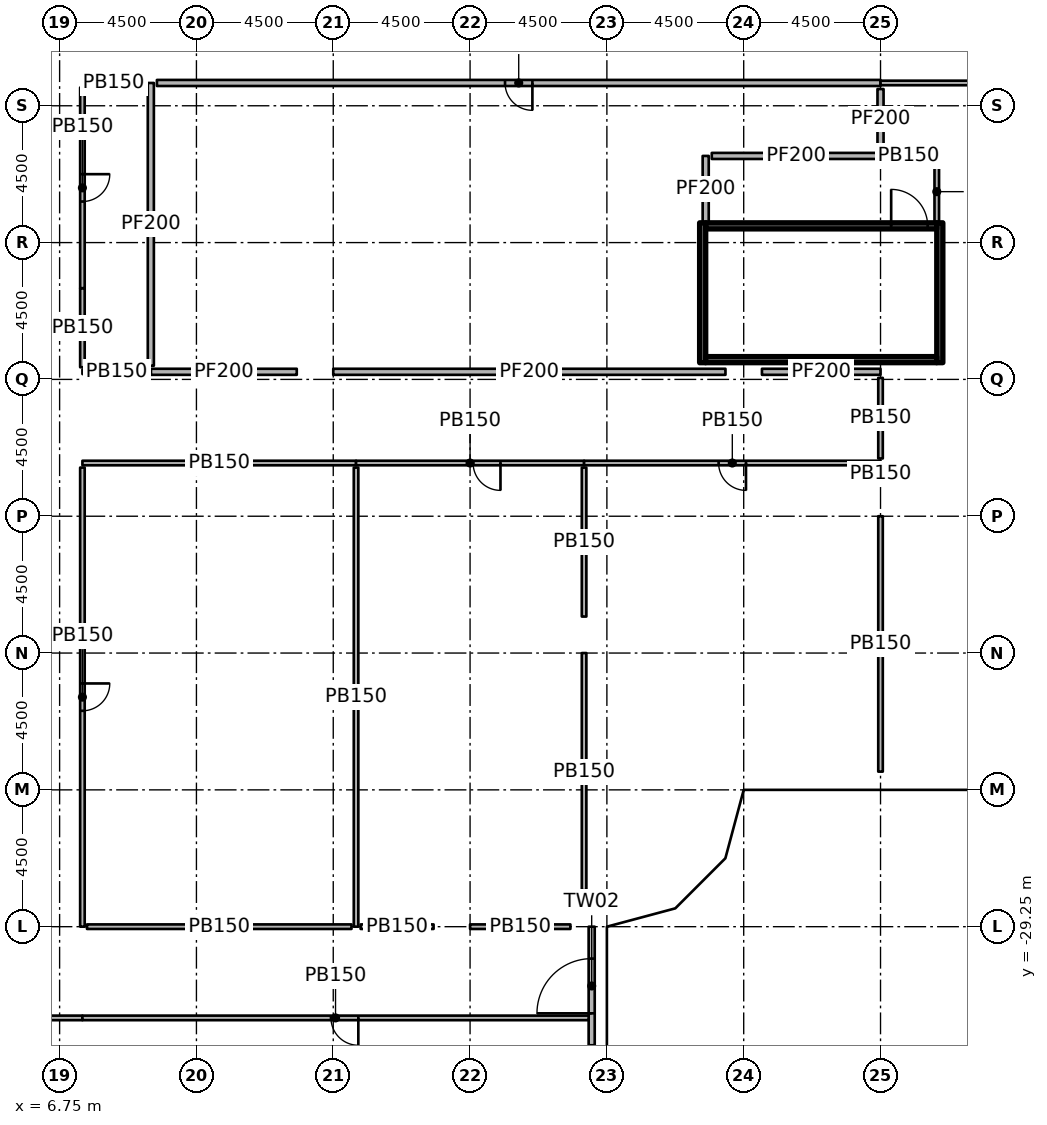
"""IFC4 building model, lengths in metres.
Left out: names, types, materials, properties, quantities, classifications, styles, units other than length and angle.
Written with IfcOpenShell. Run it as: python <this file> out.ifc"""

import sys

from ifc_helpers import new_model, si_unit, direction, frame, frame_2d, origin, origin_2d, place, context, subcontext, project, spatial, rectangle, extrude, element, fill, save


model = new_model("IFC4")
c1 = context("Model", 3, precision=1e-05, world=origin(), true_north=direction((0.0, 1.0)))
c2 = subcontext(c1, "Body", "Model", "MODEL_VIEW")
j1 = project(units=[si_unit("LENGTHUNIT", "METRE"), si_unit("PLANEANGLEUNIT", "RADIAN")], contexts=[c1])
p1 = place(None, origin())
s1 = spatial("IfcSite", under=j1, at=p1, CompositionType="ELEMENT")
p2 = place(p1, origin())
s2 = spatial("IfcBuilding", under=s1, at=p2, CompositionType="ELEMENT")
p3 = place(p2, frame((0.0, 0.0, 7.0)))
s3 = spatial("IfcBuildingStorey", under=s2, at=p3, CompositionType="ELEMENT", Elevation=7.0)
for number, where, z_axis, x_axis in (
    (1, (6.25, -26.9, 0.0), (0.0, 0.0, 1.0), (1.0, 0.0, 0.0)),
    (2, (6.25, -24.65, 0.0), (0.0, 0.0, 1.0), (1.0, 0.0, 0.0)),
    (3, (6.25, -20.25, 0.0), (0.0, 0.0, 1.0), (1.0, 0.0, 0.0)),
    (4, (6.25, -15.75, 0.0), (0.0, 0.0, 1.0), (1.0, 0.0, 0.0)),
    (5, (6.25, -10.75, 0.0), (0.0, 0.0, 1.0), (1.0, 0.0, 0.0)),
    (6, (6.25, -6.25, 0.0), (0.0, 0.0, 1.0), (1.0, 0.0, 0.0)),
    (7, (10.65, -33.75, 0.0), (0.0, 0.0, 1.0), (1.0, 0.0, 0.0)),
    (8, (10.65, -20.25, 0.0), (0.0, 0.0, 1.0), (1.0, 0.0, 0.0)),
    (9, (10.65, -15.15, 0.0), (0.0, 0.0, 1.0), (1.0, 0.0, 0.0)),
    (10, (10.75, -6.25, 0.0), (0.0, 0.0, 1.0), (1.0, 0.0, 0.0)),
    (11, (15.15, -24.75, 0.0), (0.0, 0.0, 1.0), (1.0, 0.0, 0.0)),
    (12, (15.15, -19.65, 0.0), (0.0, 0.0, 1.0), (1.0, 0.0, 0.0)),
    (13, (15.15, -10.65, 0.0), (0.0, 0.0, 1.0), (1.0, 0.0, 0.0)),
    (14, (15.75, -6.25, 0.0), (0.0, 0.0, 1.0), (1.0, 0.0, 0.0)),
    (15, (19.65, -29.25, 0.0), (0.0, 0.0, 1.0), (1.0, 0.0, 0.0)),
    (16, (19.65, -24.15, 0.0), (0.0, 0.0, 1.0), (1.0, 0.0, 0.0)),
    (17, (19.65, -15.15, 0.0), (0.0, 0.0, 1.0), (1.0, 0.0, 0.0)),
    (18, (20.25, -6.11, 0.0), (0.0, 0.0, 1.0), (1.0, 0.0, 0.0)),
    (19, (24.15, -33.75, 0.0), (0.0, 0.0, 1.0), (1.0, 0.0, 0.0)),
    (20, (24.15, -28.65, 0.0), (0.0, 0.0, 1.0), (1.0, 0.0, 0.0)),
    (21, (24.15, -19.65, 0.0), (0.0, 0.0, 1.0), (1.0, 0.0, 0.0)),
    (22, (24.75, -6.11, 0.0), (0.0, 0.0, 1.0), (1.0, 0.0, 0.0)),
    (23, (28.65, -24.15, 0.0), (0.0, 0.0, 1.0), (1.0, 0.0, 0.0)),
    (24, (28.908, -5.475, 0.0), (0.0, 0.0, 1.0), (1.0, 0.0, 0.0)),
    (25, (28.67, -2.25, 0.0), (0.0, 0.0, 1.0), (1.0, 0.0, 0.0)),
    (26, (33.75, -15.15, 0.0), (0.0, 0.0, 1.0), (1.0, 0.0, 0.0)),
    (27, (33.11, -2.25, 0.0), (0.0, 0.0, 1.0), (1.0, 0.0, 0.0)),
):
    element("IfcColumn", number, at=place(p3, frame(where, z_axis=z_axis, x_axis=x_axis)), inside=s3, PredefinedType="COLUMN", context=c2, shape_type="SweptSolid", body=[
        extrude(rectangle(XDim=1.2, YDim=1.2, at=origin_2d()), origin(), (0.0, 0.0, 1.0), 4.55),
    ])
p4 = place(p3, frame((24.25, -33.15, 0.0), z_axis=(0.0, 0.0, 1.0), x_axis=(0.0, 1.0, 0.0)))
e28 = element("IfcWall", 28, at=p4, inside=s3, PredefinedType="SOLIDWALL", context=c2, shape_type="SweptSolid", body=[
    extrude(rectangle(XDim=3.9, YDim=0.2, at=frame_2d((1.95, 0.0))), origin(), (0.0, 0.0, 1.0), 4.55),
])
p5 = place(p4, frame((1.05, 0.0, 0.0)))
e29 = element("IfcOpeningElement", 29, at=p5, cuts=e28, PredefinedType="OPENING", context=c2, shape_type="SweptSolid", body=[
    extrude(rectangle(XDim=1.8, YDim=2.4, at=frame_2d((0.9, 1.2))), frame((0.0, 0.11, 0.0), z_axis=(0.0, -1.0, 0.0), x_axis=(1.0, 0.0, 0.0)), (0.0, 0.0, 1.0), 0.22),
])
for number, where, z_axis, x_axis in (
    (30, (27.9, -10.7, 0.0), (0.0, 0.0, 1.0), (0.0, 1.0, 0.0)),
    (31, (35.7, -10.7, 0.0), (0.0, 0.0, 1.0), (0.0, 1.0, 0.0)),
):
    element("IfcWall", number, at=place(p3, frame(where, z_axis=z_axis, x_axis=x_axis)), inside=s3, PredefinedType="SHEAR", context=c2, shape_type="SweptSolid", body=[
        extrude(rectangle(XDim=4.6, YDim=0.2, at=frame_2d((2.3, 0.0))), origin(), (0.0, 0.0, 1.0), 4.55),
    ])
p6 = place(p3, frame((28.0, -10.6, 0.0), z_axis=(0.0, 0.0, 1.0), x_axis=(1.0, 0.0, 0.0)))
e32 = element("IfcWall", 32, at=p6, inside=s3, PredefinedType="SHEAR", context=c2, shape_type="SweptSolid", body=[
    extrude(rectangle(XDim=7.6, YDim=0.2, at=frame_2d((3.8, 0.0))), origin(), (0.0, 0.0, 1.0), 4.55),
])
p7 = place(p3, frame((28.0, -6.2, 0.0), z_axis=(0.0, 0.0, 1.0), x_axis=(1.0, 0.0, 0.0)))
e33 = element("IfcWall", 33, at=p7, inside=s3, PredefinedType="SHEAR", context=c2, shape_type="SweptSolid", body=[
    extrude(rectangle(XDim=7.6, YDim=0.2, at=frame_2d((3.8, 0.0))), origin(), (0.0, 0.0, 1.0), 4.55),
])
p8 = place(p7, frame((6.1, 0.0, 0.0)))
e34 = element("IfcOpeningElement", 34, at=p8, cuts=e33, PredefinedType="OPENING", context=c2, shape_type="SweptSolid", body=[
    extrude(rectangle(XDim=1.2, YDim=2.1, at=frame_2d((0.6, 1.05))), frame((0.0, 0.11, 0.0), z_axis=(0.0, -1.0, 0.0), x_axis=(1.0, 0.0, 0.0)), (0.0, 0.0, 1.0), 0.22),
])
p9 = place(p3, frame((28.0, -6.1, 0.0), z_axis=(0.0, 0.0, 1.0), x_axis=(0.0, 1.0, 0.0)))
e35 = element("IfcWall", 35, at=p9, inside=s3, PredefinedType="PARTITIONING", context=c2, shape_type="SweptSolid", body=[
    extrude(rectangle(XDim=2.2, YDim=0.2, at=frame_2d((1.1, 0.0))), origin(), (0.0, 0.0, 1.0), 4.55),
])
p10 = place(p3, frame((28.2, -3.9, 0.0), z_axis=(0.0, 0.0, 1.0), x_axis=(1.0, 0.0, 0.0)))
e36 = element("IfcWall", 36, at=p10, inside=s3, PredefinedType="PARTITIONING", context=c2, shape_type="SweptSolid", body=[
    extrude(rectangle(XDim=5.55, YDim=0.2, at=frame_2d((2.775, 0.0))), origin(), (0.0, 0.0, 1.0), 4.55),
])
p11 = place(p3, frame((33.75, -3.9, 0.0), z_axis=(0.0, 0.0, 1.0), x_axis=(1.0, 0.0, 0.0)))
e37 = element("IfcWall", 37, at=p11, inside=s3, PredefinedType="PARTITIONING", context=c2, shape_type="SweptSolid", body=[
    extrude(rectangle(XDim=1.85, YDim=0.15, at=frame_2d((0.925, 0.0))), origin(), (0.0, 0.0, 1.0), 4.55),
])
p12 = place(p3, frame((35.6, -4.05, 0.0), z_axis=(0.0, 0.0, 1.0), x_axis=(0.0, -1.0, 0.0)))
e38 = element("IfcWall", 38, at=p12, inside=s3, PredefinedType="PARTITIONING", context=c2, shape_type="SweptSolid", body=[
    extrude(rectangle(XDim=2.05, YDim=0.15, at=frame_2d((1.025, 0.0))), origin(), (0.0, 0.0, 1.0), 4.55),
])
p13 = place(p3, frame((9.75, -11.0, 0.0), z_axis=(0.0, 0.0, 1.0), x_axis=(1.0, 0.0, 0.0)))
e39 = element("IfcWall", 39, at=p13, inside=s3, PredefinedType="PARTITIONING", context=c2, shape_type="SweptSolid", body=[
    extrude(rectangle(XDim=4.8, YDim=0.2, at=frame_2d((2.4, 0.0))), origin(), (0.0, 0.0, 1.0), 4.55),
])
p14 = place(p3, frame((15.75, -11.0, 0.0), z_axis=(0.0, 0.0, 1.0), x_axis=(1.0, 0.0, 0.0)))
e40 = element("IfcWall", 40, at=p14, inside=s3, PredefinedType="PARTITIONING", context=c2, shape_type="SweptSolid", body=[
    extrude(rectangle(XDim=12.9, YDim=0.2, at=frame_2d((6.45, 0.0))), origin(), (0.0, 0.0, 1.0), 4.55),
])
p15 = place(p3, frame((29.85, -11.0, 0.0), z_axis=(0.0, 0.0, 1.0), x_axis=(1.0, 0.0, 0.0)))
e41 = element("IfcWall", 41, at=p15, inside=s3, PredefinedType="PARTITIONING", context=c2, shape_type="SweptSolid", body=[
    extrude(rectangle(XDim=3.9, YDim=0.2, at=frame_2d((1.95, 0.0))), origin(), (0.0, 0.0, 1.0), 4.55),
])
p16 = place(p3, frame((7.5, -11.0, 0.0), z_axis=(0.0, 0.0, 1.0), x_axis=(1.0, 0.0, 0.0)))
e42 = element("IfcWall", 42, at=p16, inside=s3, PredefinedType="PARTITIONING", context=c2, shape_type="SweptSolid", body=[
    extrude(rectangle(XDim=2.25, YDim=0.15, at=frame_2d((1.125, 0.0))), origin(), (0.0, 0.0, 1.0), 4.55),
])
p17 = place(p3, frame((16.5, -14.0, 0.0), z_axis=(0.0, 0.0, 1.0), x_axis=(-1.0, 0.0, 0.0)))
e43 = element("IfcWall", 43, at=p17, inside=s3, PredefinedType="PARTITIONING", context=c2, shape_type="SweptSolid", body=[
    extrude(rectangle(XDim=9.0, YDim=0.15, at=frame_2d((4.5, 0.0))), origin(), (0.0, 0.0, 1.0), 4.55),
])
p18 = place(p3, frame((24.0, -14.0, 0.0), z_axis=(0.0, 0.0, 1.0), x_axis=(-1.0, 0.0, 0.0)))
e44 = element("IfcWall", 44, at=p18, inside=s3, PredefinedType="PARTITIONING", context=c2, shape_type="SweptSolid", body=[
    extrude(rectangle(XDim=7.5, YDim=0.15, at=frame_2d((3.75, 0.0))), origin(), (0.0, 0.0, 1.0), 4.55),
])
p19 = place(p18, frame((2.75, 0.0, 0.0)))
e45 = element("IfcOpeningElement", 45, at=p19, cuts=e44, PredefinedType="OPENING", context=c2, shape_type="SweptSolid", body=[
    extrude(rectangle(XDim=0.9, YDim=2.1, at=frame_2d((0.45, 1.05))), frame((0.0, 0.085, 0.0), z_axis=(0.0, -1.0, 0.0), x_axis=(1.0, 0.0, 0.0)), (0.0, 0.0, 1.0), 0.17),
])
p20 = place(p3, frame((33.75, -14.0, 0.0), z_axis=(0.0, 0.0, 1.0), x_axis=(-1.0, 0.0, 0.0)))
e46 = element("IfcWall", 46, at=p20, inside=s3, PredefinedType="PARTITIONING", context=c2, shape_type="SweptSolid", body=[
    extrude(rectangle(XDim=9.75, YDim=0.15, at=frame_2d((4.875, 0.0))), origin(), (0.0, 0.0, 1.0), 4.55),
])
p21 = place(p20, frame((4.425, 0.0, 0.0)))
e47 = element("IfcOpeningElement", 47, at=p21, cuts=e46, PredefinedType="OPENING", context=c2, shape_type="SweptSolid", body=[
    extrude(rectangle(XDim=0.9, YDim=2.1, at=frame_2d((0.45, 1.05))), frame((0.0, 0.085, 0.0), z_axis=(0.0, -1.0, 0.0), x_axis=(1.0, 0.0, 0.0)), (0.0, 0.0, 1.0), 0.17),
])
p22 = place(p3, frame((33.75, -11.2, 0.0), z_axis=(0.0, 0.0, 1.0), x_axis=(0.0, -1.0, 0.0)))
e48 = element("IfcWall", 48, at=p22, inside=s3, PredefinedType="PARTITIONING", context=c2, shape_type="SweptSolid", body=[
    extrude(rectangle(XDim=2.65, YDim=0.15, at=frame_2d((1.325, 0.0))), origin(), (0.0, 0.0, 1.0), 4.55),
])
p23 = place(p3, frame((9.75, -10.8, 0.0), z_axis=(0.0, 0.0, 1.0), x_axis=(0.0, 1.0, 0.0)))
e49 = element("IfcWall", 49, at=p23, inside=s3, PredefinedType="PARTITIONING", context=c2, shape_type="SweptSolid", body=[
    extrude(rectangle(XDim=9.3, YDim=0.2, at=frame_2d((4.65, 0.0))), origin(), (0.0, 0.0, 1.0), 4.55),
])
p24 = place(p3, frame((33.75, -1.5, 0.0), z_axis=(0.0, 0.0, 1.0), x_axis=(-1.0, 0.0, 0.0)))
e50 = element("IfcWall", 50, at=p24, inside=s3, PredefinedType="PARTITIONING", context=c2, shape_type="SweptSolid", body=[
    extrude(rectangle(XDim=23.8, YDim=0.2, at=frame_2d((11.9, 0.0))), origin(), (0.0, 0.0, 1.0), 4.55),
])
p25 = place(p24, frame((11.45, 0.0, 0.0)))
e51 = element("IfcOpeningElement", 51, at=p25, cuts=e50, PredefinedType="OPENING", context=c2, shape_type="SweptSolid", body=[
    extrude(rectangle(XDim=0.9, YDim=2.1, at=frame_2d((0.45, 1.05))), frame((0.0, 0.11, 0.0), z_axis=(0.0, -1.0, 0.0), x_axis=(1.0, 0.0, 0.0)), (0.0, 0.0, 1.0), 0.22),
])
p26 = place(p3, frame((33.75, -1.7, 0.0), z_axis=(0.0, 0.0, 1.0), x_axis=(0.0, -1.0, 0.0)))
e52 = element("IfcWall", 52, at=p26, inside=s3, PredefinedType="PARTITIONING", context=c2, shape_type="SweptSolid", body=[
    extrude(rectangle(XDim=2.0, YDim=0.2, at=frame_2d((1.0, 0.0))), origin(), (0.0, 0.0, 1.0), 4.55),
])
p27 = place(p3, frame((7.5, -10.85, 0.0), z_axis=(0.0, 0.0, 1.0), x_axis=(0.0, 1.0, 0.0)))
e53 = element("IfcWall", 53, at=p27, inside=s3, PredefinedType="PARTITIONING", context=c2, shape_type="SweptSolid", body=[
    extrude(rectangle(XDim=2.6, YDim=0.15, at=frame_2d((1.3, 0.0))), origin(), (0.0, 0.0, 1.0), 4.55),
])
p28 = place(p3, frame((7.5, -1.5, 0.0), z_axis=(0.0, 0.0, 1.0), x_axis=(1.0, 0.0, 0.0)))
e54 = element("IfcWall", 54, at=p28, inside=s3, PredefinedType="PARTITIONING", context=c2, shape_type="SweptSolid", body=[
    extrude(rectangle(XDim=2.05, YDim=0.15, at=frame_2d((1.025, 0.0))), origin(), (0.0, 0.0, 1.0), 4.55),
])
p29 = place(p3, frame((7.5, -1.65, 0.0), z_axis=(0.0, 0.0, 1.0), x_axis=(0.0, -1.0, 0.0)))
e55 = element("IfcWall", 55, at=p29, inside=s3, PredefinedType="PARTITIONING", context=c2, shape_type="SweptSolid", body=[
    extrude(rectangle(XDim=6.6, YDim=0.15, at=frame_2d((3.3, 0.0))), origin(), (0.0, 0.0, 1.0), 4.55),
])
p30 = place(p29, frame((2.85, 0.0, 0.0)))
e56 = element("IfcOpeningElement", 56, at=p30, cuts=e55, PredefinedType="OPENING", context=c2, shape_type="SweptSolid", body=[
    extrude(rectangle(XDim=0.9, YDim=2.1, at=frame_2d((0.45, 1.05))), frame((0.0, 0.085, 0.0), z_axis=(0.0, -1.0, 0.0), x_axis=(1.0, 0.0, 0.0)), (0.0, 0.0, 1.0), 0.17),
])
p31 = place(p3, frame((16.5, -14.15, 0.0), z_axis=(0.0, 0.0, 1.0), x_axis=(0.0, -1.0, 0.0)))
e57 = element("IfcWall", 57, at=p31, inside=s3, PredefinedType="PARTITIONING", context=c2, shape_type="SweptSolid", body=[
    extrude(rectangle(XDim=15.1, YDim=0.15, at=frame_2d((7.55, 0.0))), origin(), (0.0, 0.0, 1.0), 4.55),
])
p32 = place(p3, frame((7.5, -14.15, 0.0), z_axis=(0.0, 0.0, 1.0), x_axis=(0.0, -1.0, 0.0)))
e58 = element("IfcWall", 58, at=p32, inside=s3, PredefinedType="PARTITIONING", context=c2, shape_type="SweptSolid", body=[
    extrude(rectangle(XDim=15.1, YDim=0.15, at=frame_2d((7.55, 0.0))), origin(), (0.0, 0.0, 1.0), 4.55),
])
p33 = place(p32, frame((7.1, 0.0, 0.0)))
e59 = element("IfcOpeningElement", 59, at=p33, cuts=e58, PredefinedType="OPENING", context=c2, shape_type="SweptSolid", body=[
    extrude(rectangle(XDim=0.9, YDim=2.1, at=frame_2d((0.45, 1.05))), frame((0.0, 0.085, 0.0), z_axis=(0.0, -1.0, 0.0), x_axis=(1.0, 0.0, 0.0)), (0.0, 0.0, 1.0), 0.17),
])
p34 = place(p3, frame((16.35, -29.25, 0.0), z_axis=(0.0, 0.0, 1.0), x_axis=(-1.0, 0.0, 0.0)))
e60 = element("IfcWall", 60, at=p34, inside=s3, PredefinedType="PARTITIONING", context=c2, shape_type="SweptSolid", body=[
    extrude(rectangle(XDim=8.7, YDim=0.15, at=frame_2d((4.35, 0.0))), origin(), (0.0, 0.0, 1.0), 4.55),
])
p35 = place(p3, frame((24.0, -14.15, 0.0), z_axis=(0.0, 0.0, 1.0), x_axis=(0.0, -1.0, 0.0)))
e61 = element("IfcWall", 61, at=p35, inside=s3, PredefinedType="PARTITIONING", context=c2, shape_type="SweptSolid", body=[
    extrude(rectangle(XDim=4.9, YDim=0.15, at=frame_2d((2.45, 0.0))), origin(), (0.0, 0.0, 1.0), 4.55),
])
p36 = place(p3, frame((24.0, -20.25, 0.0), z_axis=(0.0, 0.0, 1.0), x_axis=(0.0, -1.0, 0.0)))
e62 = element("IfcWall", 62, at=p36, inside=s3, PredefinedType="PARTITIONING", context=c2, shape_type="SweptSolid", body=[
    extrude(rectangle(XDim=7.8, YDim=0.15, at=frame_2d((3.9, 0.0))), origin(), (0.0, 0.0, 1.0), 4.55),
])
p37 = place(p3, frame((23.55, -29.25, 0.0), z_axis=(0.0, 0.0, 1.0), x_axis=(-1.0, 0.0, 0.0)))
e63 = element("IfcWall", 63, at=p37, inside=s3, PredefinedType="PARTITIONING", context=c2, shape_type="SweptSolid", body=[
    extrude(rectangle(XDim=3.3, YDim=0.15, at=frame_2d((1.65, 0.0))), origin(), (0.0, 0.0, 1.0), 4.55),
])
p38 = place(p3, frame((19.05, -29.25, 0.0), z_axis=(0.0, 0.0, 1.0), x_axis=(-1.0, 0.0, 0.0)))
e64 = element("IfcWall", 64, at=p38, inside=s3, PredefinedType="PARTITIONING", context=c2, shape_type="SweptSolid", body=[
    extrude(rectangle(XDim=2.4, YDim=0.15, at=frame_2d((1.2, 0.0))), origin(), (0.0, 0.0, 1.0), 4.55),
])
p39 = place(p3, frame((33.75, -14.15, 0.0), z_axis=(0.0, 0.0, 1.0), x_axis=(0.0, -1.0, 0.0)))
e65 = element("IfcWall", 65, at=p39, inside=s3, PredefinedType="PARTITIONING", context=c2, shape_type="SweptSolid", body=[
    extrude(rectangle(XDim=0.4, YDim=0.15, at=frame_2d((0.2, 0.0))), origin(), (0.0, 0.0, 1.0), 4.55),
])
p40 = place(p3, frame((33.75, -15.75, 0.0), z_axis=(0.0, 0.0, 1.0), x_axis=(0.0, -1.0, 0.0)))
e66 = element("IfcWall", 66, at=p40, inside=s3, PredefinedType="PARTITIONING", context=c2, shape_type="SweptSolid", body=[
    extrude(rectangle(XDim=8.4, YDim=0.15, at=frame_2d((4.2, 0.0))), origin(), (0.0, 0.0, 1.0), 4.55),
])
p41 = place(p3, frame((7.5, -32.25, 0.0), z_axis=(0.0, 0.0, 1.0), x_axis=(-1.0, 0.0, 0.0)))
e67 = element("IfcWall", 67, at=p41, inside=s3, PredefinedType="PARTITIONING", context=c2, shape_type="SweptSolid", body=[
    extrude(rectangle(XDim=6.0, YDim=0.15, at=frame_2d((3.0, 0.0))), origin(), (0.0, 0.0, 1.0), 4.55),
])
p42 = place(p3, frame((51.15, -1.5, 0.0), z_axis=(0.0, 0.0, 1.0), x_axis=(-1.0, 0.0, 0.0)))
e68 = element("IfcWall", 68, at=p42, inside=s3, PredefinedType="PARTITIONING", context=c2, shape_type="SweptSolid", body=[
    extrude(rectangle(XDim=17.4, YDim=0.15, at=frame_2d((8.7, 0.0))), origin(), (0.0, 0.0, 1.0), 4.55),
])
p43 = place(p42, frame((7.95, 0.0, 0.0)))
e69 = element("IfcOpeningElement", 69, at=p43, cuts=e68, PredefinedType="OPENING", context=c2, shape_type="SweptSolid", body=[
    extrude(rectangle(XDim=0.9, YDim=2.1, at=frame_2d((0.45, 1.05))), frame((0.0, 0.085, 0.0), z_axis=(0.0, -1.0, 0.0), x_axis=(1.0, 0.0, 0.0)), (0.0, 0.0, 1.0), 0.17),
])
p44 = place(p3, frame((24.15, -32.25, 0.0), z_axis=(0.0, 0.0, 1.0), x_axis=(-1.0, 0.0, 0.0)))
e70 = element("IfcWall", 70, at=p44, inside=s3, PredefinedType="PARTITIONING", context=c2, shape_type="SweptSolid", body=[
    extrude(rectangle(XDim=16.65, YDim=0.15, at=frame_2d((8.325, 0.0))), origin(), (0.0, 0.0, 1.0), 4.55),
])
p45 = place(p44, frame((7.575, 0.0, 0.0)))
e71 = element("IfcOpeningElement", 71, at=p45, cuts=e70, PredefinedType="OPENING", context=c2, shape_type="SweptSolid", body=[
    extrude(rectangle(XDim=0.9, YDim=2.1, at=frame_2d((0.45, 1.05))), frame((0.0, 0.085, 0.0), z_axis=(0.0, -1.0, 0.0), x_axis=(1.0, 0.0, 0.0)), (0.0, 0.0, 1.0), 0.17),
])
p46 = place(p5, origin())
e72 = element("IfcDoor", 72, at=p46, inside=s3, OperationType="SINGLE_SWING_LEFT", PredefinedType="DOOR", context=c2, shape_type="SweptSolid", body=[
    extrude(rectangle(XDim=1.8, YDim=2.4, at=frame_2d((0.9, 1.2))), frame((0.0, 0.025, 0.0), z_axis=(0.0, -1.0, 0.0), x_axis=(1.0, 0.0, 0.0)), (0.0, 0.0, 1.0), 0.05),
])
fill(e29, e72)
p47 = place(p8, origin())
e73 = element("IfcDoor", 73, at=p47, inside=s3, OperationType="SINGLE_SWING_RIGHT", PredefinedType="DOOR", context=c2, shape_type="SweptSolid", body=[
    extrude(rectangle(XDim=1.2, YDim=2.1, at=frame_2d((0.6, 1.05))), frame((0.0, 0.025, 0.0), z_axis=(0.0, -1.0, 0.0), x_axis=(1.0, 0.0, 0.0)), (0.0, 0.0, 1.0), 0.05),
])
fill(e34, e73)
p48 = place(p19, origin())
e74 = element("IfcDoor", 74, at=p48, inside=s3, OperationType="SINGLE_SWING_LEFT", PredefinedType="DOOR", context=c2, shape_type="SweptSolid", body=[
    extrude(rectangle(XDim=0.9, YDim=2.1, at=frame_2d((0.45, 1.05))), frame((0.0, 0.025, 0.0), z_axis=(0.0, -1.0, 0.0), x_axis=(1.0, 0.0, 0.0)), (0.0, 0.0, 1.0), 0.05),
])
fill(e45, e74)
p49 = place(p21, origin())
e75 = element("IfcDoor", 75, at=p49, inside=s3, OperationType="SINGLE_SWING_LEFT", PredefinedType="DOOR", context=c2, shape_type="SweptSolid", body=[
    extrude(rectangle(XDim=0.9, YDim=2.1, at=frame_2d((0.45, 1.05))), frame((0.0, 0.025, 0.0), z_axis=(0.0, -1.0, 0.0), x_axis=(1.0, 0.0, 0.0)), (0.0, 0.0, 1.0), 0.05),
])
fill(e47, e75)
p50 = place(p25, origin())
e76 = element("IfcDoor", 76, at=p50, inside=s3, OperationType="SINGLE_SWING_LEFT", PredefinedType="DOOR", context=c2, shape_type="SweptSolid", body=[
    extrude(rectangle(XDim=0.9, YDim=2.1, at=frame_2d((0.45, 1.05))), frame((0.0, 0.025, 0.0), z_axis=(0.0, -1.0, 0.0), x_axis=(1.0, 0.0, 0.0)), (0.0, 0.0, 1.0), 0.05),
])
fill(e51, e76)
p51 = place(p30, origin())
e77 = element("IfcDoor", 77, at=p51, inside=s3, OperationType="SINGLE_SWING_LEFT", PredefinedType="DOOR", context=c2, shape_type="SweptSolid", body=[
    extrude(rectangle(XDim=0.9, YDim=2.1, at=frame_2d((0.45, 1.05))), frame((0.0, 0.025, 0.0), z_axis=(0.0, -1.0, 0.0), x_axis=(1.0, 0.0, 0.0)), (0.0, 0.0, 1.0), 0.05),
])
fill(e56, e77)
p52 = place(p33, origin())
e78 = element("IfcDoor", 78, at=p52, inside=s3, OperationType="SINGLE_SWING_LEFT", PredefinedType="DOOR", context=c2, shape_type="SweptSolid", body=[
    extrude(rectangle(XDim=0.9, YDim=2.1, at=frame_2d((0.45, 1.05))), frame((0.0, 0.025, 0.0), z_axis=(0.0, -1.0, 0.0), x_axis=(1.0, 0.0, 0.0)), (0.0, 0.0, 1.0), 0.05),
])
fill(e59, e78)
p53 = place(p45, origin())
e79 = element("IfcDoor", 79, at=p53, inside=s3, OperationType="SINGLE_SWING_LEFT", PredefinedType="DOOR", context=c2, shape_type="SweptSolid", body=[
    extrude(rectangle(XDim=0.9, YDim=2.1, at=frame_2d((0.45, 1.05))), frame((0.0, 0.025, 0.0), z_axis=(0.0, -1.0, 0.0), x_axis=(1.0, 0.0, 0.0)), (0.0, 0.0, 1.0), 0.05),
])
fill(e71, e79)
save(model, sys.argv[1])
